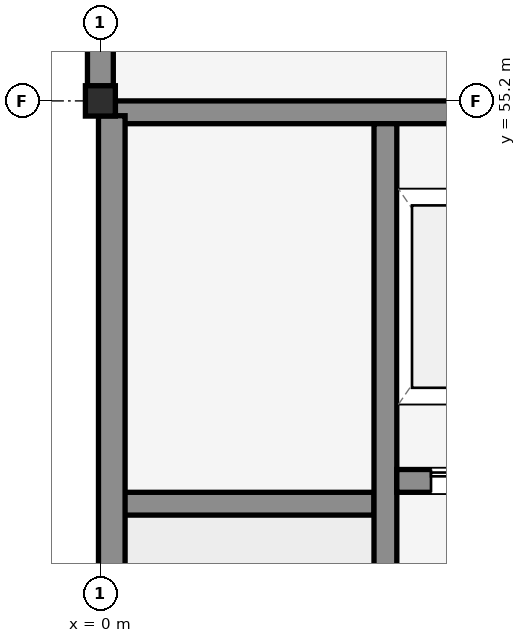
"""IFC4 building model, lengths in metres.
Left out: names, types, materials, properties, quantities, classifications, styles, units other than length and angle.
Written with IfcOpenShell. Run it as: python <this file> out.ifc"""

import sys

from ifc_helpers import new_model, si_unit, direction, frame, frame_2d, origin, origin_2d, place, context, subcontext, project, spatial, rectangle, i_section, extrude, element, fill, save


model = new_model("IFC4")
c1 = context("Model", 3, precision=1e-05, world=origin(), true_north=direction((0.0, 1.0)))
c2 = subcontext(c1, "Body", "Model", "MODEL_VIEW")
j1 = project(units=[si_unit("LENGTHUNIT", "METRE"), si_unit("PLANEANGLEUNIT", "RADIAN")], contexts=[c1])
p1 = place(None, origin())
s1 = spatial("IfcSite", under=j1, at=p1, CompositionType="ELEMENT")
p2 = place(p1, origin())
s2 = spatial("IfcBuilding", under=s1, at=p2, CompositionType="ELEMENT")
p3 = place(p2, frame((0.0, 0.0, -5.4)))
s3 = spatial("IfcBuildingStorey", under=s2, at=p3, CompositionType="ELEMENT", Elevation=-5.4)
p4 = place(p3, frame((0.0, 55.2, 0.0), z_axis=(0.0, 0.0, 1.0), x_axis=(1.0, 0.0, 0.0)))
e1 = element("IfcColumn", 1, at=p4, inside=s3, PredefinedType="COLUMN", context=c2, shape_type="SweptSolid", body=[
    extrude(i_section(OverallWidth=0.399, OverallDepth=0.394, WebThickness=0.023, FlangeThickness=0.037, FilletRadius=0.015, at=origin_2d()), origin(), (0.0, 0.0, 1.0), 5.4),
])
p5 = place(p3, frame((0.0, 55.395, 0.0), z_axis=(0.0, 0.0, 1.0), x_axis=(0.0, 1.0, 0.0)))
e2 = element("IfcWall", 2, at=p5, inside=s3, PredefinedType="USERDEFINED", context=c2, shape_type="SweptSolid", body=[
    extrude(rectangle(XDim=8.01, YDim=0.34, at=frame_2d((4.005, 0.0))), origin(), (0.0, 0.0, 1.0), 4.06),
])
p6 = place(p3, frame((0.198, 55.05, 0.0), z_axis=(0.0, 0.0, 1.0), x_axis=(1.0, 0.0, 0.0)))
e3 = element("IfcWall", 3, at=p6, inside=s3, PredefinedType="SHEAR", context=c2, shape_type="SweptSolid", body=[
    extrude(rectangle(XDim=8.005, YDim=0.3, at=frame_2d((4.002, 0.0))), origin(), (0.0, 0.0, 1.0), 5.12),
])
p7 = place(p3, frame((0.3, 49.9, 0.0), z_axis=(0.0, 0.0, 1.0), x_axis=(1.0, 0.0, 0.0)))
e4 = element("IfcWall", 4, at=p7, inside=s3, PredefinedType="SHEAR", context=c2, shape_type="SweptSolid", body=[
    extrude(rectangle(XDim=3.3, YDim=0.3, at=frame_2d((1.65, 0.0))), origin(), (0.0, 0.0, 1.0), 5.12),
])
p8 = place(p3, frame((0.15, 38.595, 0.0), z_axis=(0.0, 0.0, 1.0), x_axis=(0.0, 1.0, 0.0)))
e5 = element("IfcWall", 5, at=p8, inside=s3, PredefinedType="SHEAR", context=c2, shape_type="SweptSolid", body=[
    extrude(rectangle(XDim=16.41, YDim=0.35, at=frame_2d((8.205, 0.0))), origin(), (0.0, 0.0, 1.0), 5.12),
])
p9 = place(p3, frame((3.75, 38.7, 0.0), z_axis=(0.0, 0.0, 1.0), x_axis=(0.0, 1.0, 0.0)))
e6 = element("IfcWall", 6, at=p9, inside=s3, PredefinedType="SHEAR", context=c2, shape_type="SweptSolid", body=[
    extrude(rectangle(XDim=16.2, YDim=0.3, at=frame_2d((8.1, 0.0))), origin(), (0.0, 0.0, 1.0), 5.12),
])
p10 = place(p9, frame((0.5, 0.0, 0.0)))
e7 = element("IfcOpeningElement", 7, at=p10, cuts=e6, PredefinedType="OPENING", context=c2, shape_type="SweptSolid", body=[
    extrude(rectangle(XDim=1.15, YDim=2.15, at=frame_2d((0.575, 1.075))), frame((0.0, 0.16, 0.0), z_axis=(0.0, -1.0, 0.0), x_axis=(1.0, 0.0, 0.0)), (0.0, 0.0, 1.0), 0.32),
])
p11 = place(p3, frame((3.9, 50.2, 0.0), z_axis=(0.0, 0.0, 1.0), x_axis=(1.0, 0.0, 0.0)))
e8 = element("IfcWall", 8, at=p11, inside=s3, PredefinedType="SHEAR", context=c2, shape_type="SweptSolid", body=[
    extrude(rectangle(XDim=4.2, YDim=0.3, at=frame_2d((2.1, 0.0))), origin(), (0.0, 0.0, 1.0), 5.12),
])
p12 = place(p11, frame((0.45, 0.0, 0.0)))
e9 = element("IfcOpeningElement", 9, at=p12, cuts=e8, PredefinedType="OPENING", context=c2, shape_type="SweptSolid", body=[
    extrude(rectangle(XDim=1.1, YDim=2.2, at=frame_2d((0.55, 1.1))), frame((0.0, 0.16, 0.0), z_axis=(0.0, -1.0, 0.0), x_axis=(1.0, 0.0, 0.0)), (0.0, 0.0, 1.0), 0.32),
])
p13 = place(p11, frame((2.65, 0.0, 0.0)))
e10 = element("IfcOpeningElement", 10, at=p13, cuts=e8, PredefinedType="OPENING", context=c2, shape_type="SweptSolid", body=[
    extrude(rectangle(XDim=1.1, YDim=2.2, at=frame_2d((0.55, 1.1))), frame((0.0, 0.16, 0.0), z_axis=(0.0, -1.0, 0.0), x_axis=(1.0, 0.0, 0.0)), (0.0, 0.0, 1.0), 0.32),
])
p14 = place(p12, origin())
e11 = element("IfcDoor", 11, at=p14, inside=s3, OperationType="SLIDING_TO_LEFT", PredefinedType="DOOR", context=c2, shape_type="SweptSolid", body=[
    extrude(rectangle(XDim=1.1, YDim=2.2, at=frame_2d((0.55, 1.1))), frame((0.0, 0.025, 0.0), z_axis=(0.0, -1.0, 0.0), x_axis=(1.0, 0.0, 0.0)), (0.0, 0.0, 1.0), 0.05),
])
fill(e9, e11)
save(model, sys.argv[1])
